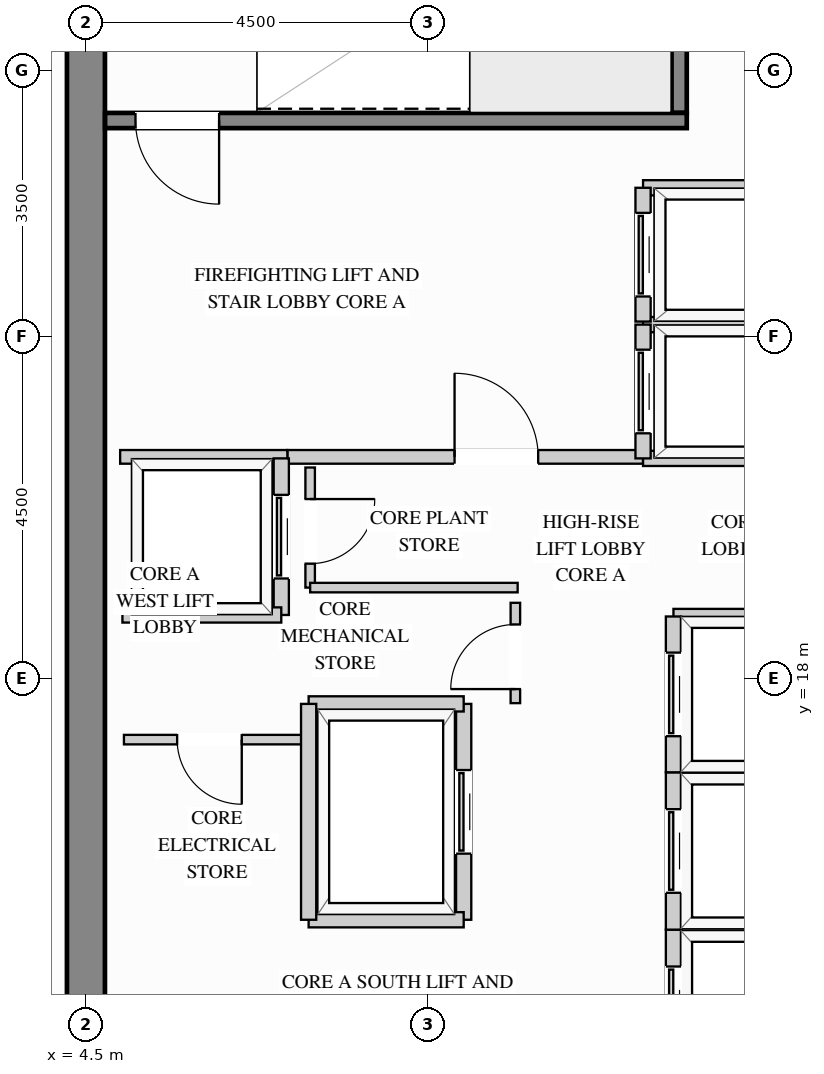
"""IFC4 building model, lengths in metres.
Left out: names, types, materials, properties, quantities, classifications, styles, units other than length and angle.
Written with IfcOpenShell. Run it as: python <this file> out.ifc"""

import sys

from ifc_helpers import new_model, si_unit, direction, frame, frame_2d, origin, place, context, subcontext, project, spatial, rectangle, extrude, source, transform, mapped, element, fill, save


model = new_model("IFC4")
c1 = context("Model", 3, precision=1e-05, world=origin(), true_north=direction((0.0, 1.0)))
c2 = subcontext(c1, "Body", "Model", "MODEL_VIEW")
j1 = project(units=[si_unit("LENGTHUNIT", "METRE"), si_unit("PLANEANGLEUNIT", "RADIAN")], contexts=[c1])
p1 = place(None, origin())
s1 = spatial("IfcSite", under=j1, at=p1, CompositionType="ELEMENT")
p2 = place(p1, origin())
s2 = spatial("IfcBuilding", under=s1, at=p2, CompositionType="ELEMENT")
p3 = place(p2, frame((0.0, 0.0, 273.6)))
s3 = spatial("IfcBuildingStorey", under=s2, at=p3, CompositionType="ELEMENT", Elevation=273.6)
m1 = source(origin(), c2, "Body", "SweptSolid", [
    extrude(rectangle(XDim=20.5, YDim=0.5, at=frame_2d((10.25, 0.0))), origin(), (0.0, 0.0, 1.0), 3.37),
])
p4 = place(p3, frame((4.5, 8.75, 0.0), z_axis=(0.0, 0.0, 1.0), x_axis=(0.0, 1.0, 0.0)))
e1 = element("IfcWall", 1, at=p4, inside=s3, PredefinedType="SHEAR", context=c2, shape_type="MappedRepresentation", body=[
    mapped(m1, transform((0.0, 0.0, 0.0), x_axis=(1.0, 0.0, 0.0), y_axis=(0.0, 1.0, 0.0), z_axis=(0.0, 0.0, 1.0))),
])
p5 = place(p3, frame((7.15, 20.92, 0.0), z_axis=(0.0, 0.0, 1.0), x_axis=(1.0, 0.0, 0.0)))
e2 = element("IfcWall", 2, at=p5, inside=s3, PredefinedType="PARTITIONING", context=c2, shape_type="SweptSolid", body=[
    extrude(rectangle(XDim=4.68, YDim=0.18, at=frame_2d((2.34, 0.0))), origin(), (0.0, 0.0, 1.0), 3.355),
])
p6 = place(p5, frame((2.2, 0.0, 0.0)))
e3 = element("IfcOpeningElement", 3, at=p6, cuts=e2, PredefinedType="OPENING", context=c2, shape_type="SweptSolid", body=[
    extrude(rectangle(XDim=1.1, YDim=2.15, at=frame_2d((0.55, 1.075))), frame((0.0, 0.1, 0.0), z_axis=(0.0, -1.0, 0.0), x_axis=(1.0, 0.0, 0.0)), (0.0, 0.0, 1.0), 0.2),
])
m2 = source(origin(), c2, "Body", "SweptSolid", [
    extrude(rectangle(XDim=2.2, YDim=0.18, at=frame_2d((1.1, 0.0))), origin(), (0.0, 0.0, 1.0), 3.355),
])
p7 = place(p3, frame((4.95, 20.92, 0.0), z_axis=(0.0, 0.0, 1.0), x_axis=(1.0, 0.0, 0.0)))
e4 = element("IfcWall", 4, at=p7, inside=s3, PredefinedType="PARTITIONING", context=c2, shape_type="MappedRepresentation", body=[
    mapped(m2, transform((0.0, 0.0, 0.0), x_axis=(1.0, 0.0, 0.0), y_axis=(0.0, 1.0, 0.0), z_axis=(0.0, 0.0, 1.0))),
])
p8 = place(p3, frame((10.15, 17.68, 0.0), z_axis=(0.0, 0.0, 1.0), x_axis=(0.0, 1.0, 0.0)))
e5 = element("IfcWall", 5, at=p8, inside=s3, PredefinedType="PARTITIONING", context=c2, shape_type="SweptSolid", body=[
    extrude(rectangle(XDim=1.32, YDim=0.125, at=frame_2d((0.66, 0.0))), origin(), (0.0, 0.0, 1.0), 3.355),
])
p9 = place(p8, frame((0.185, 0.0, 0.0)))
e6 = element("IfcOpeningElement", 6, at=p9, cuts=e5, PredefinedType="OPENING", context=c2, shape_type="SweptSolid", body=[
    extrude(rectangle(XDim=0.85, YDim=2.1, at=frame_2d((0.425, 1.05))), frame((0.0, 0.073, 0.0), z_axis=(0.0, -1.0, 0.0), x_axis=(1.0, 0.0, 0.0)), (0.0, 0.0, 1.0), 0.145),
])
p10 = place(p3, frame((7.45, 19.2, 0.0), z_axis=(0.0, 0.0, 1.0), x_axis=(0.0, 1.0, 0.0)))
e7 = element("IfcWall", 7, at=p10, inside=s3, PredefinedType="PARTITIONING", context=c2, shape_type="SweptSolid", body=[
    extrude(rectangle(XDim=1.58, YDim=0.125, at=frame_2d((0.79, 0.0))), origin(), (0.0, 0.0, 1.0), 3.355),
])
p11 = place(p10, frame((0.315, 0.0, 0.0)))
e8 = element("IfcOpeningElement", 8, at=p11, cuts=e7, PredefinedType="OPENING", context=c2, shape_type="SweptSolid", body=[
    extrude(rectangle(XDim=0.85, YDim=2.1, at=frame_2d((0.425, 1.05))), frame((0.0, 0.073, 0.0), z_axis=(0.0, -1.0, 0.0), x_axis=(1.0, 0.0, 0.0)), (0.0, 0.0, 1.0), 0.145),
])
m3 = source(origin(), c2, "Body", "SweptSolid", [
    extrude(rectangle(XDim=2.73, YDim=0.125, at=frame_2d((1.365, 0.0))), origin(), (0.0, 0.0, 1.0), 3.355),
])
p12 = place(p3, frame((7.45, 19.2, 0.0), z_axis=(0.0, 0.0, 1.0), x_axis=(1.0, 0.0, 0.0)))
e9 = element("IfcWall", 9, at=p12, inside=s3, PredefinedType="PARTITIONING", context=c2, shape_type="MappedRepresentation", body=[
    mapped(m3, transform((0.0, 0.0, 0.0), x_axis=(1.0, 0.0, 0.0), y_axis=(0.0, 1.0, 0.0), z_axis=(0.0, 0.0, 1.0))),
])
p13 = place(p3, frame((5.0, 17.2, 0.0), z_axis=(0.0, 0.0, 1.0), x_axis=(1.0, 0.0, 0.0)))
e10 = element("IfcWall", 10, at=p13, inside=s3, PredefinedType="PARTITIONING", context=c2, shape_type="SweptSolid", body=[
    extrude(rectangle(XDim=2.4, YDim=0.125, at=frame_2d((1.2, 0.0))), origin(), (0.0, 0.0, 1.0), 3.355),
])
p14 = place(p13, frame((0.7, 0.0, 0.0)))
e11 = element("IfcOpeningElement", 11, at=p14, cuts=e10, PredefinedType="OPENING", context=c2, shape_type="SweptSolid", body=[
    extrude(rectangle(XDim=0.85, YDim=2.1, at=frame_2d((0.425, 1.05))), frame((0.0, 0.073, 0.0), z_axis=(0.0, -1.0, 0.0), x_axis=(1.0, 0.0, 0.0)), (0.0, 0.0, 1.0), 0.145),
])
m4 = source(origin(), c2, "Body", "SweptSolid", [
    extrude(rectangle(XDim=2.39, YDim=0.2, at=frame_2d((1.195, 0.0))), origin(), (0.0, 0.0, 1.0), 3.355),
])
for number, where, z_axis, x_axis in (
    (12, (11.83, 22.66, 0.0), (0.0, 0.0, 1.0), (1.0, 0.0, 0.0)),
    (13, (11.83, 20.9, 0.0), (0.0, 0.0, 1.0), (1.0, 0.0, 0.0)),
):
    element("IfcWall", number, at=place(p3, frame(where, z_axis=z_axis, x_axis=x_axis)), inside=s3, PredefinedType="PARTITIONING", context=c2, shape_type="MappedRepresentation", body=[
        mapped(m4, transform((0.0, 0.0, 0.0), x_axis=(1.0, 0.0, 0.0), y_axis=(0.0, 1.0, 0.0), z_axis=(0.0, 0.0, 1.0))),
    ])
p15 = place(p3, frame((11.83, 20.9, 0.0), z_axis=(0.0, 0.0, 1.0), x_axis=(0.0, 1.0, 0.0)))
e14 = element("IfcWall", 14, at=p15, inside=s3, PredefinedType="PARTITIONING", context=c2, shape_type="SweptSolid", body=[
    extrude(rectangle(XDim=1.76, YDim=0.2, at=frame_2d((0.88, 0.0))), origin(), (0.0, 0.0, 1.0), 3.355),
])
p16 = place(p15, frame((0.33, 0.0, 0.0)))
e15 = element("IfcOpeningElement", 15, at=p16, cuts=e14, PredefinedType="OPENING", context=c2, shape_type="SweptSolid", body=[
    extrude(rectangle(XDim=1.1, YDim=2.2, at=frame_2d((0.55, 1.1))), frame((0.0, 0.11, 0.0), z_axis=(0.0, -1.0, 0.0), x_axis=(1.0, 0.0, 0.0)), (0.0, 0.0, 1.0), 0.22),
])
p17 = place(p3, frame((11.83, 24.46, 0.0), z_axis=(0.0, 0.0, 1.0), x_axis=(1.0, 0.0, 0.0)))
e16 = element("IfcWall", 16, at=p17, inside=s3, PredefinedType="PARTITIONING", context=c2, shape_type="MappedRepresentation", body=[
    mapped(m4, transform((0.0, 0.0, 0.0), x_axis=(1.0, 0.0, 0.0), y_axis=(0.0, 1.0, 0.0), z_axis=(0.0, 0.0, 1.0))),
])
p18 = place(p3, frame((11.83, 22.7, 0.0), z_axis=(0.0, 0.0, 1.0), x_axis=(0.0, 1.0, 0.0)))
e17 = element("IfcWall", 17, at=p18, inside=s3, PredefinedType="PARTITIONING", context=c2, shape_type="SweptSolid", body=[
    extrude(rectangle(XDim=1.76, YDim=0.2, at=frame_2d((0.88, 0.0))), origin(), (0.0, 0.0, 1.0), 3.355),
])
p19 = place(p18, frame((0.33, 0.0, 0.0)))
e18 = element("IfcOpeningElement", 18, at=p19, cuts=e17, PredefinedType="OPENING", context=c2, shape_type="SweptSolid", body=[
    extrude(rectangle(XDim=1.1, YDim=2.2, at=frame_2d((0.55, 1.1))), frame((0.0, 0.11, 0.0), z_axis=(0.0, -1.0, 0.0), x_axis=(1.0, 0.0, 0.0)), (0.0, 0.0, 1.0), 0.22),
])
m5 = source(origin(), c2, "Body", "SweptSolid", [
    extrude(rectangle(XDim=1.99, YDim=0.2, at=frame_2d((0.995, 0.0))), origin(), (0.0, 0.0, 1.0), 3.355),
])
p20 = place(p3, frame((12.23, 14.7, 0.0), z_axis=(0.0, 0.0, 1.0), x_axis=(1.0, 0.0, 0.0)))
e19 = element("IfcWall", 19, at=p20, inside=s3, PredefinedType="PARTITIONING", context=c2, shape_type="MappedRepresentation", body=[
    mapped(m5, transform((0.0, 0.0, 0.0), x_axis=(1.0, 0.0, 0.0), y_axis=(0.0, 1.0, 0.0), z_axis=(0.0, 0.0, 1.0))),
])
p21 = place(p3, frame((12.23, 12.63, 0.0), z_axis=(0.0, 0.0, 1.0), x_axis=(0.0, 1.0, 0.0)))
e20 = element("IfcWall", 20, at=p21, inside=s3, PredefinedType="PARTITIONING", context=c2, shape_type="SweptSolid", body=[
    extrude(rectangle(XDim=2.07, YDim=0.2, at=frame_2d((1.035, 0.0))), origin(), (0.0, 0.0, 1.0), 3.355),
])
p22 = place(p21, frame((0.485, 0.0, 0.0)))
e21 = element("IfcOpeningElement", 21, at=p22, cuts=e20, PredefinedType="OPENING", context=c2, shape_type="SweptSolid", body=[
    extrude(rectangle(XDim=1.1, YDim=2.2, at=frame_2d((0.55, 1.1))), frame((0.0, 0.11, 0.0), z_axis=(0.0, -1.0, 0.0), x_axis=(1.0, 0.0, 0.0)), (0.0, 0.0, 1.0), 0.22),
])
p23 = place(p3, frame((12.23, 16.77, 0.0), z_axis=(0.0, 0.0, 1.0), x_axis=(1.0, 0.0, 0.0)))
e22 = element("IfcWall", 22, at=p23, inside=s3, PredefinedType="PARTITIONING", context=c2, shape_type="MappedRepresentation", body=[
    mapped(m5, transform((0.0, 0.0, 0.0), x_axis=(1.0, 0.0, 0.0), y_axis=(0.0, 1.0, 0.0), z_axis=(0.0, 0.0, 1.0))),
])
p24 = place(p3, frame((12.23, 14.7, 0.0), z_axis=(0.0, 0.0, 1.0), x_axis=(0.0, 1.0, 0.0)))
e23 = element("IfcWall", 23, at=p24, inside=s3, PredefinedType="PARTITIONING", context=c2, shape_type="SweptSolid", body=[
    extrude(rectangle(XDim=2.07, YDim=0.2, at=frame_2d((1.035, 0.0))), origin(), (0.0, 0.0, 1.0), 3.355),
])
p25 = place(p24, frame((0.485, 0.0, 0.0)))
e24 = element("IfcOpeningElement", 24, at=p25, cuts=e23, PredefinedType="OPENING", context=c2, shape_type="SweptSolid", body=[
    extrude(rectangle(XDim=1.1, YDim=2.2, at=frame_2d((0.55, 1.1))), frame((0.0, 0.11, 0.0), z_axis=(0.0, -1.0, 0.0), x_axis=(1.0, 0.0, 0.0)), (0.0, 0.0, 1.0), 0.22),
])
p26 = place(p3, frame((12.23, 18.82, 0.0), z_axis=(0.0, 0.0, 1.0), x_axis=(1.0, 0.0, 0.0)))
e25 = element("IfcWall", 25, at=p26, inside=s3, PredefinedType="PARTITIONING", context=c2, shape_type="MappedRepresentation", body=[
    mapped(m5, transform((0.0, 0.0, 0.0), x_axis=(1.0, 0.0, 0.0), y_axis=(0.0, 1.0, 0.0), z_axis=(0.0, 0.0, 1.0))),
])
p27 = place(p3, frame((12.23, 16.77, 0.0), z_axis=(0.0, 0.0, 1.0), x_axis=(0.0, 1.0, 0.0)))
e26 = element("IfcWall", 26, at=p27, inside=s3, PredefinedType="PARTITIONING", context=c2, shape_type="SweptSolid", body=[
    extrude(rectangle(XDim=2.05, YDim=0.2, at=frame_2d((1.025, 0.0))), origin(), (0.0, 0.0, 1.0), 3.355),
])
p28 = place(p27, frame((0.475, 0.0, 0.0)))
e27 = element("IfcOpeningElement", 27, at=p28, cuts=e26, PredefinedType="OPENING", context=c2, shape_type="SweptSolid", body=[
    extrude(rectangle(XDim=1.1, YDim=2.2, at=frame_2d((0.55, 1.1))), frame((0.0, 0.11, 0.0), z_axis=(0.0, -1.0, 0.0), x_axis=(1.0, 0.0, 0.0)), (0.0, 0.0, 1.0), 0.22),
])
p29 = place(p3, frame((7.07, 18.84, 0.0), z_axis=(0.0, 0.0, 1.0), x_axis=(0.0, 1.0, 0.0)))
e28 = element("IfcWall", 28, at=p29, inside=s3, PredefinedType="PARTITIONING", context=c2, shape_type="SweptSolid", body=[
    extrude(rectangle(XDim=2.06, YDim=0.2, at=frame_2d((1.03, 0.0))), origin(), (0.0, 0.0, 1.0), 3.355),
])
p30 = place(p29, frame((0.48, 0.0, 0.0)))
e29 = element("IfcOpeningElement", 29, at=p30, cuts=e28, PredefinedType="OPENING", context=c2, shape_type="SweptSolid", body=[
    extrude(rectangle(XDim=1.1, YDim=2.2, at=frame_2d((0.55, 1.1))), frame((0.0, 0.11, 0.0), z_axis=(0.0, -1.0, 0.0), x_axis=(1.0, 0.0, 0.0)), (0.0, 0.0, 1.0), 0.22),
])
m6 = source(origin(), c2, "Body", "SweptSolid", [
    extrude(rectangle(XDim=2.09, YDim=0.2, at=frame_2d((1.045, 0.0))), origin(), (0.0, 0.0, 1.0), 3.355),
])
p31 = place(p3, frame((4.98, 18.84, 0.0), z_axis=(0.0, 0.0, 1.0), x_axis=(1.0, 0.0, 0.0)))
e30 = element("IfcWall", 30, at=p31, inside=s3, PredefinedType="PARTITIONING", context=c2, shape_type="MappedRepresentation", body=[
    mapped(m6, transform((0.0, 0.0, 0.0), x_axis=(1.0, 0.0, 0.0), y_axis=(0.0, 1.0, 0.0), z_axis=(0.0, 0.0, 1.0))),
])
p32 = place(p3, frame((9.47, 14.83, 0.0), z_axis=(0.0, 0.0, 1.0), x_axis=(0.0, 1.0, 0.0)))
e31 = element("IfcWall", 31, at=p32, inside=s3, PredefinedType="PARTITIONING", context=c2, shape_type="SweptSolid", body=[
    extrude(rectangle(XDim=2.84, YDim=0.2, at=frame_2d((1.42, 0.0))), origin(), (0.0, 0.0, 1.0), 3.355),
])
p33 = place(p32, frame((0.87, 0.0, 0.0)))
e32 = element("IfcOpeningElement", 32, at=p33, cuts=e31, PredefinedType="OPENING", context=c2, shape_type="SweptSolid", body=[
    extrude(rectangle(XDim=1.1, YDim=2.2, at=frame_2d((0.55, 1.1))), frame((0.0, 0.11, 0.0), z_axis=(0.0, -1.0, 0.0), x_axis=(1.0, 0.0, 0.0)), (0.0, 0.0, 1.0), 0.22),
])
m7 = source(origin(), c2, "Body", "SweptSolid", [
    extrude(rectangle(XDim=2.04, YDim=0.2, at=frame_2d((1.02, 0.0))), origin(), (0.0, 0.0, 1.0), 2.355),
])
p34 = place(p3, frame((7.43, 17.67, 0.0), z_axis=(0.0, 0.0, 1.0), x_axis=(1.0, 0.0, 0.0)))
e33 = element("IfcWall", 33, at=p34, inside=s3, PredefinedType="PARTITIONING", context=c2, shape_type="MappedRepresentation", body=[
    mapped(m7, transform((0.0, 0.0, 0.0), x_axis=(1.0, 0.0, 0.0), y_axis=(0.0, 1.0, 0.0), z_axis=(0.0, 0.0, 1.0))),
])
m8 = source(origin(), c2, "Body", "SweptSolid", [
    extrude(rectangle(XDim=2.04, YDim=0.2, at=frame_2d((1.02, 0.0))), origin(), (0.0, 0.0, 1.0), 3.355),
])
p35 = place(p3, frame((7.43, 14.83, 0.0), z_axis=(0.0, 0.0, 1.0), x_axis=(1.0, 0.0, 0.0)))
e34 = element("IfcWall", 34, at=p35, inside=s3, PredefinedType="PARTITIONING", context=c2, shape_type="MappedRepresentation", body=[
    mapped(m8, transform((0.0, 0.0, 0.0), x_axis=(1.0, 0.0, 0.0), y_axis=(0.0, 1.0, 0.0), z_axis=(0.0, 0.0, 1.0))),
])
m9 = source(origin(), c2, "Body", "SweptSolid", [
    extrude(rectangle(XDim=2.84, YDim=0.2, at=frame_2d((1.42, 0.0))), origin(), (0.0, 0.0, 1.0), 3.355),
])
p36 = place(p3, frame((7.43, 14.83, 0.0), z_axis=(0.0, 0.0, 1.0), x_axis=(0.0, 1.0, 0.0)))
e35 = element("IfcWall", 35, at=p36, inside=s3, PredefinedType="PARTITIONING", context=c2, shape_type="MappedRepresentation", body=[
    mapped(m9, transform((0.0, 0.0, 0.0), x_axis=(1.0, 0.0, 0.0), y_axis=(0.0, 1.0, 0.0), z_axis=(0.0, 0.0, 1.0))),
])
m10 = source(origin(), c2, "Body", "SweptSolid", [
    extrude(rectangle(XDim=3.803, YDim=0.2, at=frame_2d((1.901, 0.0))), origin(), (0.0, 0.0, 1.0), 3.37),
])
p37 = place(p3, frame((12.305, 25.445, 0.0), z_axis=(0.0, 0.0, 1.0), x_axis=(0.0, 1.0, 0.0)))
e36 = element("IfcWall", 36, at=p37, inside=s3, PredefinedType="SHEAR", context=c2, shape_type="MappedRepresentation", body=[
    mapped(m10, transform((0.0, 0.0, 0.0), x_axis=(1.0, 0.0, 0.0), y_axis=(0.0, 1.0, 0.0), z_axis=(0.0, 0.0, 1.0))),
])
p38 = place(p3, frame((4.752, 25.345, 0.0), z_axis=(0.0, 0.0, 1.0), x_axis=(1.0, 0.0, 0.0)))
e37 = element("IfcWall", 37, at=p38, inside=s3, PredefinedType="SHEAR", context=c2, shape_type="SweptSolid", body=[
    extrude(rectangle(XDim=7.653, YDim=0.2, at=frame_2d((3.827, 0.0))), origin(), (0.0, 0.0, 1.0), 3.37),
])
p39 = place(p38, frame((0.4, 0.0, 0.0)))
e38 = element("IfcOpeningElement", 38, at=p39, cuts=e37, PredefinedType="OPENING", context=c2, shape_type="SweptSolid", body=[
    extrude(rectangle(XDim=1.1, YDim=2.15, at=frame_2d((0.55, 1.075))), frame((0.0, 0.11, 0.0), z_axis=(0.0, -1.0, 0.0), x_axis=(1.0, 0.0, 0.0)), (0.0, 0.0, 1.0), 0.22),
])
m11 = source(origin(), c2, "Body", "SweptSolid", [
    extrude(rectangle(XDim=1.1, YDim=2.15, at=frame_2d((0.55, 1.075))), frame((0.0, 0.025, 0.0), z_axis=(0.0, -1.0, 0.0), x_axis=(1.0, 0.0, 0.0)), (0.0, 0.0, 1.0), 0.05),
])
p40 = place(p6, origin())
e39 = element("IfcDoor", 39, at=p40, inside=s3, OperationType="SINGLE_SWING_LEFT", PredefinedType="DOOR", context=c2, shape_type="MappedRepresentation", body=[
    mapped(m11, transform((0.0, 0.0, 0.0), x_axis=(1.0, 0.0, 0.0), y_axis=(0.0, 1.0, 0.0), z_axis=(0.0, 0.0, 1.0))),
])
fill(e3, e39)
m12 = source(origin(), c2, "Body", "SweptSolid", [
    extrude(rectangle(XDim=1.1, YDim=2.2, at=frame_2d((0.55, 1.1))), frame((0.0, 0.025, 0.0), z_axis=(0.0, -1.0, 0.0), x_axis=(1.0, 0.0, 0.0)), (0.0, 0.0, 1.0), 0.05),
])
p41 = place(p16, origin())
e40 = element("IfcDoor", 40, at=p41, inside=s3, OperationType="SLIDING_TO_LEFT", PredefinedType="DOOR", context=c2, shape_type="MappedRepresentation", body=[
    mapped(m12, transform((0.0, 0.0, 0.0), x_axis=(1.0, 0.0, 0.0), y_axis=(0.0, 1.0, 0.0), z_axis=(0.0, 0.0, 1.0))),
])
fill(e15, e40)
p42 = place(p19, origin())
e41 = element("IfcDoor", 41, at=p42, inside=s3, OperationType="SLIDING_TO_LEFT", PredefinedType="DOOR", context=c2, shape_type="MappedRepresentation", body=[
    mapped(m12, transform((0.0, 0.0, 0.0), x_axis=(1.0, 0.0, 0.0), y_axis=(0.0, 1.0, 0.0), z_axis=(0.0, 0.0, 1.0))),
])
fill(e18, e41)
p43 = place(p22, origin())
e42 = element("IfcDoor", 42, at=p43, inside=s3, OperationType="SLIDING_TO_LEFT", PredefinedType="DOOR", context=c2, shape_type="MappedRepresentation", body=[
    mapped(m12, transform((0.0, 0.0, 0.0), x_axis=(1.0, 0.0, 0.0), y_axis=(0.0, 1.0, 0.0), z_axis=(0.0, 0.0, 1.0))),
])
fill(e21, e42)
p44 = place(p25, origin())
e43 = element("IfcDoor", 43, at=p44, inside=s3, OperationType="SLIDING_TO_LEFT", PredefinedType="DOOR", context=c2, shape_type="MappedRepresentation", body=[
    mapped(m12, transform((0.0, 0.0, 0.0), x_axis=(1.0, 0.0, 0.0), y_axis=(0.0, 1.0, 0.0), z_axis=(0.0, 0.0, 1.0))),
])
fill(e24, e43)
p45 = place(p28, origin())
e44 = element("IfcDoor", 44, at=p45, inside=s3, OperationType="SLIDING_TO_LEFT", PredefinedType="DOOR", context=c2, shape_type="MappedRepresentation", body=[
    mapped(m12, transform((0.0, 0.0, 0.0), x_axis=(1.0, 0.0, 0.0), y_axis=(0.0, 1.0, 0.0), z_axis=(0.0, 0.0, 1.0))),
])
fill(e27, e44)
p46 = place(p30, origin())
e45 = element("IfcDoor", 45, at=p46, inside=s3, OperationType="SLIDING_TO_LEFT", PredefinedType="DOOR", context=c2, shape_type="MappedRepresentation", body=[
    mapped(m12, transform((0.0, 0.0, 0.0), x_axis=(1.0, 0.0, 0.0), y_axis=(0.0, 1.0, 0.0), z_axis=(0.0, 0.0, 1.0))),
])
fill(e29, e45)
p47 = place(p33, origin())
e46 = element("IfcDoor", 46, at=p47, inside=s3, OperationType="SLIDING_TO_LEFT", PredefinedType="DOOR", context=c2, shape_type="MappedRepresentation", body=[
    mapped(m12, transform((0.0, 0.0, 0.0), x_axis=(1.0, 0.0, 0.0), y_axis=(0.0, 1.0, 0.0), z_axis=(0.0, 0.0, 1.0))),
])
fill(e32, e46)
m13 = source(origin(), c2, "Body", "SweptSolid", [
    extrude(rectangle(XDim=0.85, YDim=2.1, at=frame_2d((0.425, 1.05))), frame((0.0, 0.025, 0.0), z_axis=(0.0, -1.0, 0.0), x_axis=(1.0, 0.0, 0.0)), (0.0, 0.0, 1.0), 0.05),
])
p48 = place(p9, origin())
e47 = element("IfcDoor", 47, at=p48, inside=s3, OperationType="SINGLE_SWING_LEFT", PredefinedType="DOOR", context=c2, shape_type="MappedRepresentation", body=[
    mapped(m13, transform((0.0, 0.0, 0.0), x_axis=(1.0, 0.0, 0.0), y_axis=(0.0, 1.0, 0.0), z_axis=(0.0, 0.0, 1.0))),
])
fill(e6, e47)
p49 = place(p14, origin())
e48 = element("IfcDoor", 48, at=p49, inside=s3, OperationType="SINGLE_SWING_RIGHT", PredefinedType="DOOR", context=c2, shape_type="MappedRepresentation", body=[
    mapped(m13, transform((0.0, 0.0, 0.0), x_axis=(1.0, 0.0, 0.0), y_axis=(0.0, 1.0, 0.0), z_axis=(0.0, 0.0, 1.0))),
])
fill(e11, e48)
p50 = place(p11, origin())
e49 = element("IfcDoor", 49, at=p50, inside=s3, OperationType="SINGLE_SWING_RIGHT", PredefinedType="DOOR", context=c2, shape_type="MappedRepresentation", body=[
    mapped(m13, transform((0.0, 0.0, 0.0), x_axis=(1.0, 0.0, 0.0), y_axis=(0.0, 1.0, 0.0), z_axis=(0.0, 0.0, 1.0))),
])
fill(e8, e49)
m14 = source(origin(), c2, "Body", "SweptSolid", [
    extrude(rectangle(XDim=1.1, YDim=2.15, at=frame_2d((0.55, 1.075))), frame((0.0, 0.025, 0.0), z_axis=(0.0, -1.0, 0.0), x_axis=(1.0, 0.0, 0.0)), (0.0, 0.0, 1.0), 0.05),
])
p51 = place(p39, origin())
e50 = element("IfcDoor", 50, at=p51, inside=s3, OperationType="SINGLE_SWING_RIGHT", PredefinedType="DOOR", context=c2, shape_type="MappedRepresentation", body=[
    mapped(m14, transform((0.0, 0.0, 0.0), x_axis=(1.0, 0.0, 0.0), y_axis=(0.0, 1.0, 0.0), z_axis=(0.0, 0.0, 1.0))),
])
fill(e38, e50)
save(model, sys.argv[1])
